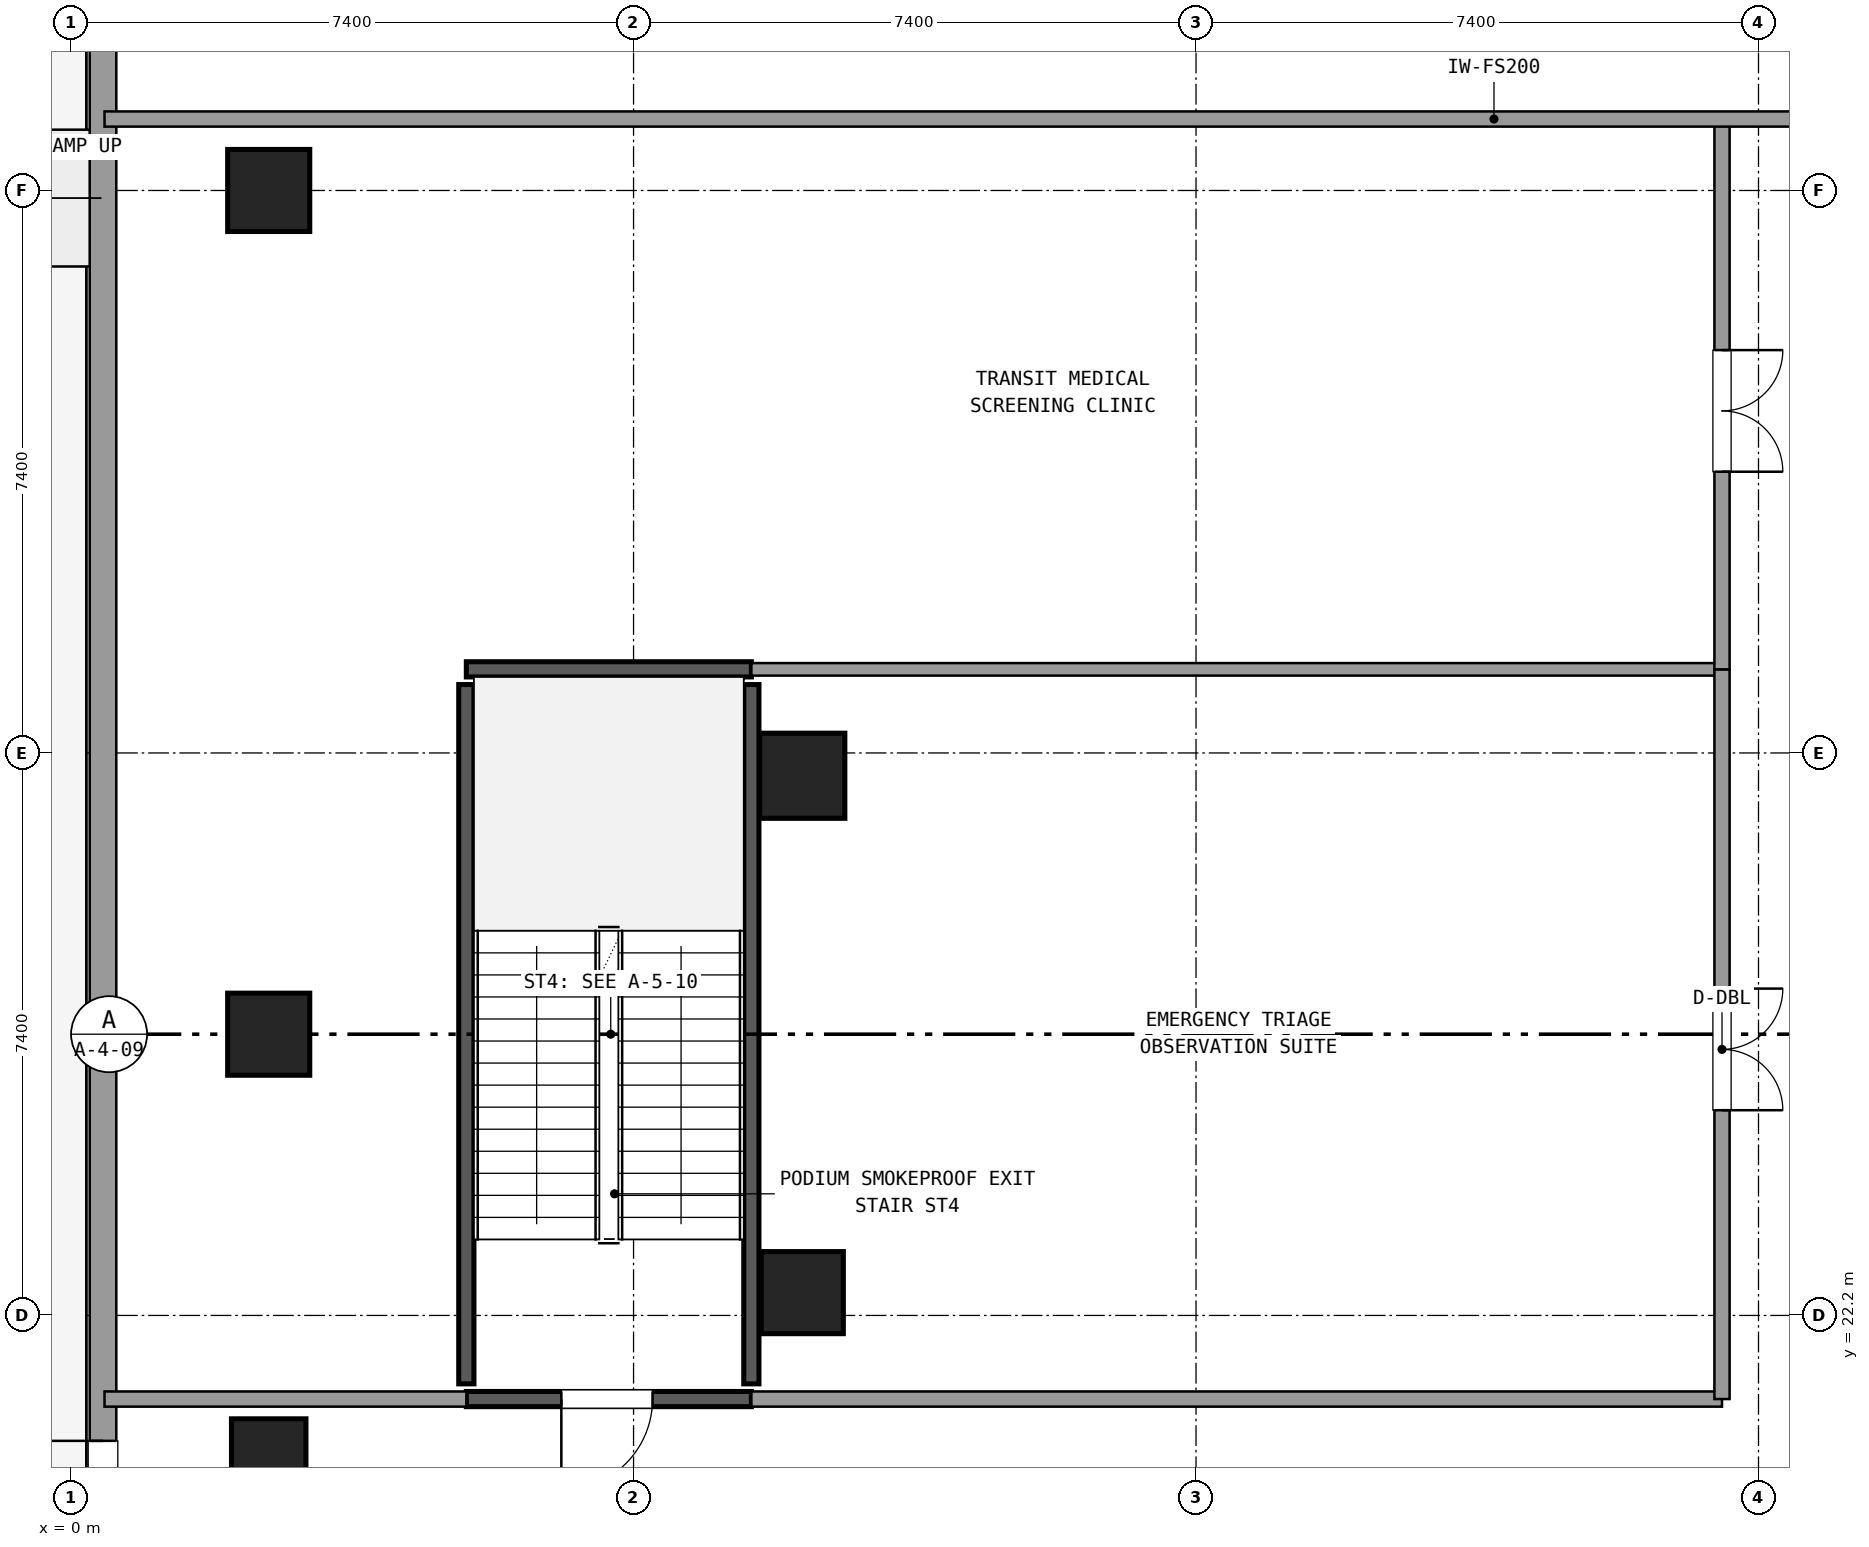
"""IFC4 building model, lengths in metres.
Left out: names, types, materials, properties, quantities, classifications, styles, units other than length and angle.
Written with IfcOpenShell. Run it as: python <this file> out.ifc"""

import sys

from ifc_helpers import new_model, si_unit, direction, frame, frame_2d, origin, origin_2d, place, context, subcontext, project, spatial, rectangle, circle, extrude, element, fill, save


model = new_model("IFC4")
c1 = context("Model", 3, precision=1e-05, world=origin(), true_north=direction((0.0, 1.0)))
c2 = subcontext(c1, "Body", "Model", "MODEL_VIEW")
j1 = project(units=[si_unit("LENGTHUNIT", "METRE"), si_unit("PLANEANGLEUNIT", "RADIAN")], contexts=[c1])
p1 = place(None, origin())
s1 = spatial("IfcSite", under=j1, at=p1, CompositionType="ELEMENT")
p2 = place(p1, origin())
s2 = spatial("IfcBuilding", under=s1, at=p2, CompositionType="ELEMENT")
p3 = place(p2, origin())
s3 = spatial("IfcBuildingStorey", under=s2, at=p3, CompositionType="ELEMENT", Elevation=0.0)
p4 = place(p3, frame((9.62, 22.5, 0.0), z_axis=(0.0, 0.0, 1.0), x_axis=(1.0, 0.0, 0.0)))
e1 = element("IfcColumn", 1, at=p4, inside=s3, PredefinedType="COLUMN", context=c2, shape_type="SweptSolid", body=[
    extrude(rectangle(XDim=1.08, YDim=1.08, at=origin_2d()), origin(), (0.0, 0.0, 1.0), 5.4),
])
p5 = place(p3, frame((9.62, 29.3, 0.0), z_axis=(0.0, 0.0, 1.0), x_axis=(1.0, 0.0, 0.0)))
e2 = element("IfcColumn", 2, at=p5, inside=s3, PredefinedType="COLUMN", context=c2, shape_type="SweptSolid", body=[
    extrude(circle(Radius=0.56, at=origin_2d()), origin(), (0.0, 0.0, 1.0), 5.4),
])
for number, where, z_axis, x_axis in (
    (3, (2.6, 25.9, 0.0), (0.0, 0.0, 1.0), (1.0, 0.0, 0.0)),
    (4, (2.6, 37.0, 0.0), (0.0, 0.0, 1.0), (1.0, 0.0, 0.0)),
):
    element("IfcColumn", number, at=place(p3, frame(where, z_axis=z_axis, x_axis=x_axis)), inside=s3, PredefinedType="COLUMN", context=c2, shape_type="SweptSolid", body=[
        extrude(rectangle(XDim=1.08, YDim=1.08, at=origin_2d()), origin(), (0.0, 0.0, 1.0), 5.4),
    ])
p6 = place(p3, frame((2.6, 20.35, 0.0), z_axis=(0.0, 0.0, 1.0), x_axis=(1.0, 0.0, 0.0)))
e5 = element("IfcColumn", 5, at=p6, inside=s3, PredefinedType="PILASTER", context=c2, shape_type="SweptSolid", body=[
    extrude(circle(Radius=0.49, at=origin_2d()), origin(), (0.0, 0.0, 1.0), 5.4),
])
p7 = place(p3, frame((0.42, 47.421, 0.0), z_axis=(0.0, 0.0, 1.0), x_axis=(0.0, -1.0, 0.0)))
e6 = element("IfcWall", 6, at=p7, inside=s3, PredefinedType="SOLIDWALL", context=c2, shape_type="SweptSolid", body=[
    extrude(rectangle(XDim=43.042, YDim=0.35, at=frame_2d((21.521, 0.0))), origin(), (0.0, 0.0, 1.0), 4.14),
])
p8 = place(p7, frame((26.871, 0.0, 0.0)))
e7 = element("IfcOpeningElement", 7, at=p8, cuts=e6, PredefinedType="OPENING", context=c2, shape_type="SweptSolid", body=[
    extrude(rectangle(XDim=2.4, YDim=2.5, at=frame_2d((1.2, 1.25))), frame((0.0, 0.185, 0.0), z_axis=(0.0, -1.0, 0.0), x_axis=(1.0, 0.0, 0.0)), (0.0, 0.0, 1.0), 0.37),
])
p9 = place(p7, frame((2.5, 0.0, 1.2)))
e8 = element("IfcOpeningElement", 8, at=p9, cuts=e6, PredefinedType="OPENING", context=c2, shape_type="SweptSolid", body=[
    extrude(rectangle(XDim=2.2, YDim=1.6, at=frame_2d((1.1, 0.8))), frame((0.0, 0.185, 0.0), z_axis=(0.0, -1.0, 0.0), x_axis=(1.0, 0.0, 0.0)), (0.0, 0.0, 1.0), 0.37),
])
p10 = place(p3, frame((5.2, 21.1, 0.0), z_axis=(0.0, 0.0, 1.0), x_axis=(1.0, 0.0, 0.0)))
e9 = element("IfcWall", 9, at=p10, inside=s3, PredefinedType="SHEAR", context=c2, shape_type="SweptSolid", body=[
    extrude(rectangle(XDim=3.75, YDim=0.2, at=frame_2d((1.875, 0.0))), origin(), (0.0, 0.0, 1.0), 5.1),
])
p11 = place(p10, frame((1.25, 0.0, 0.0)))
e10 = element("IfcOpeningElement", 10, at=p11, cuts=e9, PredefinedType="OPENING", context=c2, shape_type="SweptSolid", body=[
    extrude(rectangle(XDim=1.2, YDim=2.15, at=frame_2d((0.6, 1.075))), frame((0.0, 0.11, 0.0), z_axis=(0.0, -1.0, 0.0), x_axis=(1.0, 0.0, 0.0)), (0.0, 0.0, 1.0), 0.22),
])
p12 = place(p3, frame((5.2, 30.7, 0.0), z_axis=(0.0, 0.0, 1.0), x_axis=(1.0, 0.0, 0.0)))
e11 = element("IfcWall", 11, at=p12, inside=s3, PredefinedType="SHEAR", context=c2, shape_type="SweptSolid", body=[
    extrude(rectangle(XDim=3.75, YDim=0.2, at=frame_2d((1.875, 0.0))), origin(), (0.0, 0.0, 1.0), 5.1),
])
for number, where, z_axis, x_axis in (
    (12, (5.2, 21.3, 0.0), (0.0, 0.0, 1.0), (0.0, 1.0, 0.0)),
    (13, (8.95, 21.3, 0.0), (0.0, 0.0, 1.0), (0.0, 1.0, 0.0)),
):
    element("IfcWall", number, at=place(p3, frame(where, z_axis=z_axis, x_axis=x_axis)), inside=s3, PredefinedType="SHEAR", context=c2, shape_type="SweptSolid", body=[
        extrude(rectangle(XDim=9.2, YDim=0.2, at=frame_2d((4.6, 0.0))), origin(), (0.0, 0.0, 1.0), 5.1),
    ])
p13 = place(p3, frame((0.44, 21.1, 0.0), z_axis=(0.0, 0.0, 1.0), x_axis=(1.0, 0.0, 0.0)))
e14 = element("IfcWall", 14, at=p13, inside=s3, PredefinedType="SOLIDWALL", context=c2, shape_type="SweptSolid", body=[
    extrude(rectangle(XDim=4.76, YDim=0.2, at=frame_2d((2.38, 0.0))), origin(), (0.0, 0.0, 1.0), 4.11),
])
p14 = place(p3, frame((8.95, 21.1, 0.0), z_axis=(0.0, 0.0, 1.0), x_axis=(1.0, 0.0, 0.0)))
e15 = element("IfcWall", 15, at=p14, inside=s3, PredefinedType="SOLIDWALL", context=c2, shape_type="SweptSolid", body=[
    extrude(rectangle(XDim=12.77, YDim=0.2, at=frame_2d((6.385, 0.0))), origin(), (0.0, 0.0, 1.0), 4.11),
])
p15 = place(p3, frame((8.95, 30.7, 0.0), z_axis=(0.0, 0.0, 1.0), x_axis=(1.0, 0.0, 0.0)))
e16 = element("IfcWall", 16, at=p15, inside=s3, PredefinedType="PARTITIONING", context=c2, shape_type="SweptSolid", body=[
    extrude(rectangle(XDim=12.77, YDim=0.165, at=frame_2d((6.385, 0.0))), origin(), (0.0, 0.0, 1.0), 4.11),
])
p16 = place(p3, frame((21.72, 21.1, 0.0), z_axis=(0.0, 0.0, 1.0), x_axis=(0.0, 1.0, 0.0)))
e17 = element("IfcWall", 17, at=p16, inside=s3, PredefinedType="SOLIDWALL", context=c2, shape_type="SweptSolid", body=[
    extrude(rectangle(XDim=9.6, YDim=0.2, at=frame_2d((4.8, 0.0))), origin(), (0.0, 0.0, 1.0), 4.11),
])
p17 = place(p16, frame((3.8, 0.0, 0.0)))
e18 = element("IfcOpeningElement", 18, at=p17, cuts=e17, PredefinedType="OPENING", context=c2, shape_type="SweptSolid", body=[
    extrude(rectangle(XDim=1.6, YDim=2.2, at=frame_2d((0.8, 1.1))), frame((0.0, 0.11, 0.0), z_axis=(0.0, -1.0, 0.0), x_axis=(1.0, 0.0, 0.0)), (0.0, 0.0, 1.0), 0.22),
])
p18 = place(p3, frame((21.72, 30.7, 0.0), z_axis=(0.0, 0.0, 1.0), x_axis=(0.0, 1.0, 0.0)))
e19 = element("IfcWall", 19, at=p18, inside=s3, PredefinedType="SOLIDWALL", context=c2, shape_type="SweptSolid", body=[
    extrude(rectangle(XDim=7.24, YDim=0.2, at=frame_2d((3.62, 0.0))), origin(), (0.0, 0.0, 1.0), 4.11),
])
p19 = place(p18, frame((2.6, 0.0, 0.0)))
e20 = element("IfcOpeningElement", 20, at=p19, cuts=e19, PredefinedType="OPENING", context=c2, shape_type="SweptSolid", body=[
    extrude(rectangle(XDim=1.6, YDim=2.2, at=frame_2d((0.8, 1.1))), frame((0.0, 0.11, 0.0), z_axis=(0.0, -1.0, 0.0), x_axis=(1.0, 0.0, 0.0)), (0.0, 0.0, 1.0), 0.22),
])
p20 = place(p3, frame((0.44, 37.94, 0.0), z_axis=(0.0, 0.0, 1.0), x_axis=(1.0, 0.0, 0.0)))
e21 = element("IfcWall", 21, at=p20, inside=s3, PredefinedType="SOLIDWALL", context=c2, shape_type="SweptSolid", body=[
    extrude(rectangle(XDim=36.56, YDim=0.2, at=frame_2d((18.28, 0.0))), origin(), (0.0, 0.0, 1.0), 4.11),
])
p21 = place(p20, frame((28.56, 0.0, 0.0)))
e22 = element("IfcOpeningElement", 22, at=p21, cuts=e21, PredefinedType="OPENING", context=c2, shape_type="SweptSolid", body=[
    extrude(rectangle(XDim=2.0, YDim=2.2, at=frame_2d((1.0, 1.1))), frame((0.0, 0.11, 0.0), z_axis=(0.0, -1.0, 0.0), x_axis=(1.0, 0.0, 0.0)), (0.0, 0.0, 1.0), 0.22),
])
p22 = place(p8, frame((2.4, 0.0, 0.0), z_axis=(0.0, 0.0, 1.0), x_axis=(-1.0, 0.0, 0.0)))
e23 = element("IfcDoor", 23, at=p22, inside=s3, OperationType="DOUBLE_DOOR_SINGLE_SWING", PredefinedType="DOOR", context=c2, shape_type="SweptSolid", body=[
    extrude(rectangle(XDim=2.4, YDim=2.5, at=frame_2d((1.2, 1.25))), frame((0.0, 0.025, 0.0), z_axis=(0.0, -1.0, 0.0), x_axis=(1.0, 0.0, 0.0)), (0.0, 0.0, 1.0), 0.05),
])
fill(e7, e23)
p23 = place(p11, frame((1.2, 0.0, 0.0), z_axis=(0.0, 0.0, 1.0), x_axis=(-1.0, 0.0, 0.0)))
e24 = element("IfcDoor", 24, at=p23, inside=s3, OperationType="SINGLE_SWING_LEFT", PredefinedType="DOOR", context=c2, shape_type="SweptSolid", body=[
    extrude(rectangle(XDim=1.2, YDim=2.15, at=frame_2d((0.6, 1.075))), frame((0.0, 0.025, 0.0), z_axis=(0.0, -1.0, 0.0), x_axis=(1.0, 0.0, 0.0)), (0.0, 0.0, 1.0), 0.05),
])
fill(e10, e24)
p24 = place(p17, frame((1.6, 0.0, 0.0), z_axis=(0.0, 0.0, 1.0), x_axis=(-1.0, 0.0, 0.0)))
e25 = element("IfcDoor", 25, at=p24, inside=s3, OperationType="DOUBLE_DOOR_SINGLE_SWING", PredefinedType="DOOR", context=c2, shape_type="SweptSolid", body=[
    extrude(rectangle(XDim=1.6, YDim=2.2, at=frame_2d((0.8, 1.1))), frame((0.0, 0.025, 0.0), z_axis=(0.0, -1.0, 0.0), x_axis=(1.0, 0.0, 0.0)), (0.0, 0.0, 1.0), 0.05),
])
fill(e18, e25)
p25 = place(p19, frame((1.6, 0.0, 0.0), z_axis=(0.0, 0.0, 1.0), x_axis=(-1.0, 0.0, 0.0)))
e26 = element("IfcDoor", 26, at=p25, inside=s3, OperationType="DOUBLE_DOOR_SINGLE_SWING", PredefinedType="DOOR", context=c2, shape_type="SweptSolid", body=[
    extrude(rectangle(XDim=1.6, YDim=2.2, at=frame_2d((0.8, 1.1))), frame((0.0, 0.025, 0.0), z_axis=(0.0, -1.0, 0.0), x_axis=(1.0, 0.0, 0.0)), (0.0, 0.0, 1.0), 0.05),
])
fill(e20, e26)
save(model, sys.argv[1])
